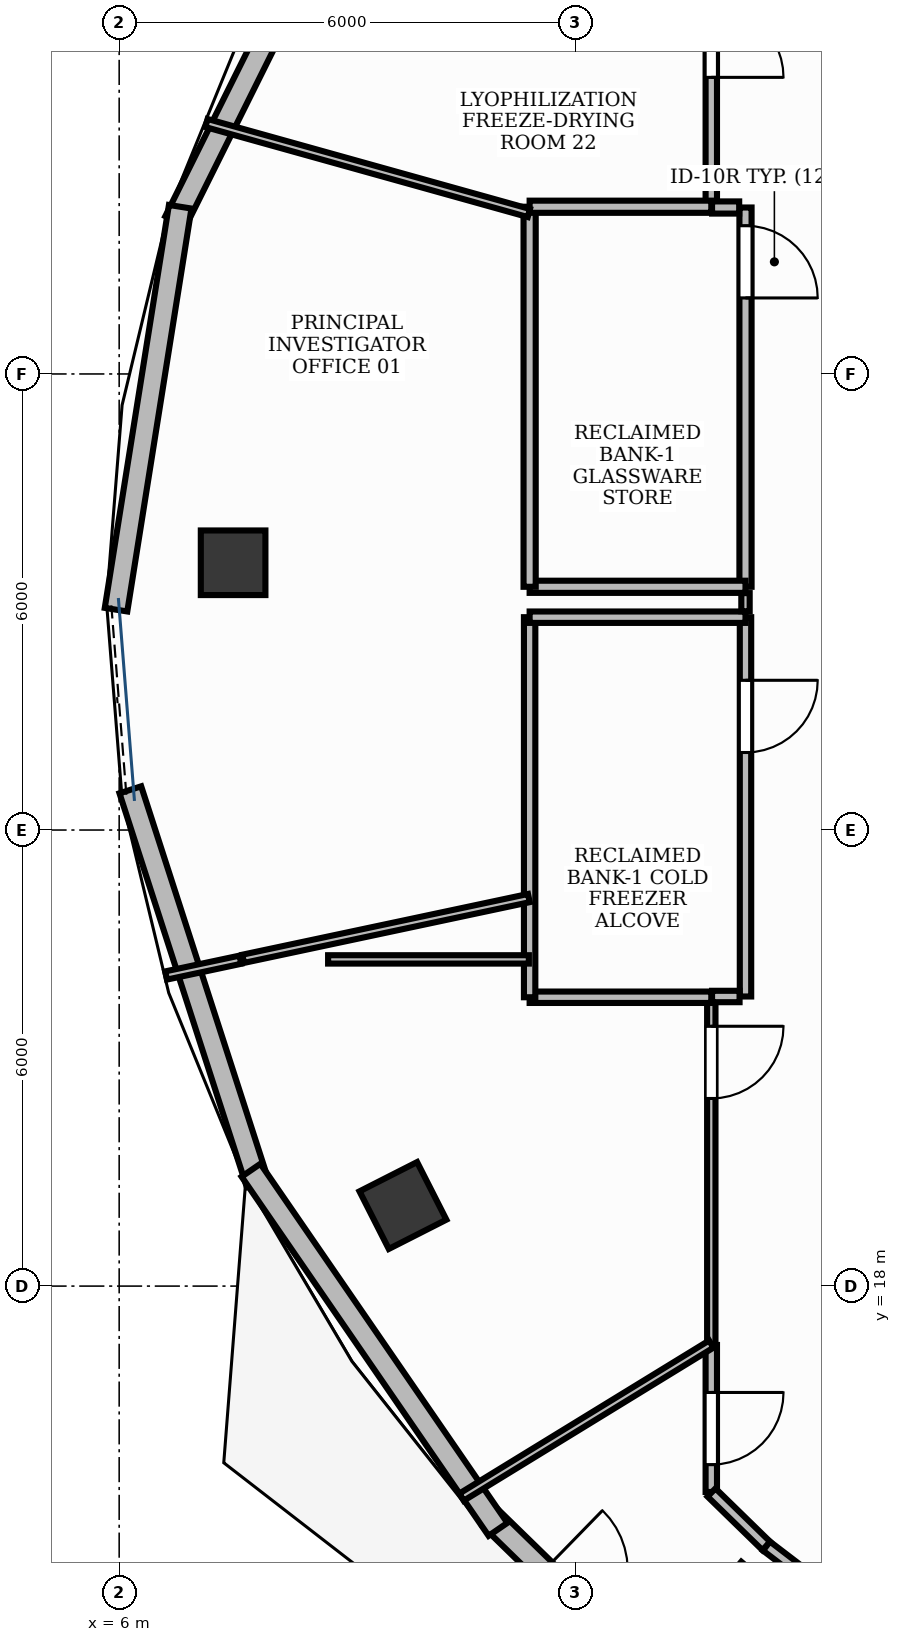
"""IFC4 building model, lengths in metres.
Left out: names, types, materials, properties, quantities, classifications, styles, units other than length and angle.
Written with IfcOpenShell. Run it as: python <this file> out.ifc"""

import sys

from ifc_helpers import new_model, si_unit, direction, frame, frame_2d, origin, origin_2d, place, context, subcontext, project, spatial, rectangle, extrude, element, fill, save


model = new_model("IFC4")
c1 = context("Model", 3, precision=1e-05, world=origin(), true_north=direction((0.0, 1.0)))
c2 = subcontext(c1, "Body", "Model", "MODEL_VIEW")
j1 = project(units=[si_unit("LENGTHUNIT", "METRE"), si_unit("PLANEANGLEUNIT", "RADIAN")], contexts=[c1])
p1 = place(None, origin())
s1 = spatial("IfcSite", under=j1, at=p1, CompositionType="ELEMENT")
p2 = place(p1, origin())
s2 = spatial("IfcBuilding", under=s1, at=p2, CompositionType="ELEMENT")
p3 = place(p2, frame((0.0, 0.0, 252.0)))
s3 = spatial("IfcBuildingStorey", under=s2, at=p3, CompositionType="ELEMENT", Elevation=252.0)
for number, where, z_axis, x_axis in (
    (1, (7.499, 27.516, -0.0), (0.0, 0.0, 1.0), (0.0, 1.0, 0.0)),
    (2, (9.733, 19.06, -0.0), (0.0, 0.0, 1.0), (-0.453, 0.891, 0.0)),
    (3, (14.235, 13.775, -0.0), (0.0, 0.0, 1.0), (-0.764, 0.645, 0.0)),
):
    element("IfcColumn", number, at=place(p3, frame(where, z_axis=z_axis, x_axis=x_axis)), inside=s3, PredefinedType="COLUMN", context=c2, shape_type="SweptSolid", body=[
        extrude(rectangle(XDim=0.85, YDim=0.85, at=origin_2d()), origin(), (0.0, 0.0, 1.0), 3.901),
    ])
p4 = place(p3, frame((10.892, 14.943, 0.0), z_axis=(0.0, 0.0, 1.0), x_axis=(0.716005135245, -0.698095012375, 0.0)))
e4 = element("IfcWall", 4, at=p4, inside=s3, PredefinedType="STANDARD", context=c2, shape_type="SweptSolid", body=[
    extrude(rectangle(XDim=3.053, YDim=0.3, at=frame_2d((1.527, 0.0))), origin(), (0.0, 0.0, 1.0), 3.9),
])
p5 = place(p4, frame((0.977, 0.0, 0.0)))
e5 = element("IfcOpeningElement", 5, at=p5, cuts=e4, PredefinedType="OPENING", context=c2, shape_type="SweptSolid", body=[
    extrude(rectangle(XDim=1.1, YDim=2.15, at=frame_2d((0.55, 1.075))), frame((0.0, 0.165, 0.0), z_axis=(0.0, -1.0, 0.0), x_axis=(1.0, 0.0, 0.0)), (0.0, 0.0, 1.0), 0.33),
])
p6 = place(p3, frame((9.222, 36.999, 0.0), z_axis=(0.0, 0.0, 1.0), x_axis=(-0.445162072567, -0.89545001488, 0.0)))
e6 = element("IfcWall", 6, at=p6, inside=s3, PredefinedType="STANDARD", context=c2, shape_type="SweptSolid", body=[
    extrude(rectangle(XDim=5.573, YDim=0.3, at=frame_2d((2.786, 0.0))), origin(), (0.0, 0.0, 1.0), 3.47),
])
p7 = place(p3, frame((6.803, 32.2, 0.0), z_axis=(0.0, 0.0, 1.0), x_axis=(-0.157240066957, -0.987560408959, 0.0)))
e7 = element("IfcWall", 7, at=p7, inside=s3, PredefinedType="STANDARD", context=c2, shape_type="SweptSolid", body=[
    extrude(rectangle(XDim=5.367, YDim=0.3, at=frame_2d((2.684, 0.0))), origin(), (0.0, 0.0, 1.0), 3.47),
])
p8 = place(p3, frame((6.147, 24.529, 0.0), z_axis=(0.0, 0.0, 1.0), x_axis=(0.307501658213, -0.951547544895, 0.0)))
e8 = element("IfcWall", 8, at=p8, inside=s3, PredefinedType="STANDARD", context=c2, shape_type="SweptSolid", body=[
    extrude(rectangle(XDim=5.447, YDim=0.3, at=frame_2d((2.724, 0.0))), origin(), (0.0, 0.0, 1.0), 3.9),
])
p9 = place(p3, frame((7.735, 19.524, 0.0), z_axis=(0.0, 0.0, 1.0), x_axis=(0.566669772846, -0.823945003349, 0.0)))
e9 = element("IfcWall", 9, at=p9, inside=s3, PredefinedType="STANDARD", context=c2, shape_type="SweptSolid", body=[
    extrude(rectangle(XDim=5.734, YDim=0.3, at=frame_2d((2.867, 0.0))), origin(), (0.0, 0.0, 1.0), 3.9),
])
p10 = place(p3, frame((14.24, 26.8, 0.0), z_axis=(0.0, 0.0, 1.0), x_axis=(0.0, -1.0, 0.0)))
e10 = element("IfcWall", 10, at=p10, inside=s3, PredefinedType="PARTITIONING", context=c2, shape_type="SweptSolid", body=[
    extrude(rectangle(XDim=4.99, YDim=0.15, at=frame_2d((2.495, 0.0))), origin(), (0.0, 0.0, 1.0), 2.91),
])
p11 = place(p10, frame((0.83, 0.0, 0.0)))
e11 = element("IfcOpeningElement", 11, at=p11, cuts=e10, PredefinedType="OPENING", context=c2, shape_type="SweptSolid", body=[
    extrude(rectangle(XDim=0.95, YDim=2.15, at=frame_2d((0.475, 1.075))), frame((0.0, 0.09, 0.0), z_axis=(0.0, -1.0, 0.0), x_axis=(1.0, 0.0, 0.0)), (0.0, 0.0, 1.0), 0.18),
])
p12 = place(p3, frame((14.24, 32.19, 0.0), z_axis=(0.0, 0.0, 1.0), x_axis=(0.0, -1.0, 0.0)))
e12 = element("IfcWall", 12, at=p12, inside=s3, PredefinedType="PARTITIONING", context=c2, shape_type="SweptSolid", body=[
    extrude(rectangle(XDim=4.99, YDim=0.16, at=frame_2d((2.495, 0.0))), origin(), (0.0, 0.0, 1.0), 2.91),
])
p13 = place(p12, frame((0.24, 0.0, 0.0)))
e13 = element("IfcOpeningElement", 13, at=p13, cuts=e12, PredefinedType="OPENING", context=c2, shape_type="SweptSolid", body=[
    extrude(rectangle(XDim=0.95, YDim=2.15, at=frame_2d((0.475, 1.075))), frame((0.0, 0.095, 0.0), z_axis=(0.0, -1.0, 0.0), x_axis=(1.0, 0.0, 0.0)), (0.0, 0.0, 1.0), 0.19),
])
p14 = place(p3, frame((13.79, 21.79, 0.0), z_axis=(0.0, 0.0, 1.0), x_axis=(0.0, -1.0, 0.0)))
e14 = element("IfcWall", 14, at=p14, inside=s3, PredefinedType="MOVABLE", context=c2, shape_type="SweptSolid", body=[
    extrude(rectangle(XDim=4.553, YDim=0.11, at=frame_2d((2.276, 0.0))), origin(), (0.0, 0.0, 1.0), 2.91),
])
p15 = place(p14, frame((0.372, 0.0, 0.0)))
e15 = element("IfcOpeningElement", 15, at=p15, cuts=e14, PredefinedType="OPENING", context=c2, shape_type="SweptSolid", body=[
    extrude(rectangle(XDim=0.95, YDim=2.15, at=frame_2d((0.475, 1.075))), frame((0.0, 0.07, 0.0), z_axis=(0.0, -1.0, 0.0), x_axis=(1.0, 0.0, 0.0)), (0.0, 0.0, 1.0), 0.14),
])
p16 = place(p3, frame((13.79, 17.226, 0.0), z_axis=(0.0, 0.0, 1.0), x_axis=(0.0, -1.0, 0.0)))
e16 = element("IfcWall", 16, at=p16, inside=s3, PredefinedType="PARTITIONING", context=c2, shape_type="SweptSolid", body=[
    extrude(rectangle(XDim=1.934, YDim=0.15, at=frame_2d((0.967, 0.0))), origin(), (0.0, 0.0, 1.0), 2.91),
])
p17 = place(p16, frame((0.625, 0.0, 0.0)))
e17 = element("IfcOpeningElement", 17, at=p17, cuts=e16, PredefinedType="OPENING", context=c2, shape_type="SweptSolid", body=[
    extrude(rectangle(XDim=0.95, YDim=2.15, at=frame_2d((0.475, 1.075))), frame((0.0, 0.09, 0.0), z_axis=(0.0, -1.0, 0.0), x_axis=(1.0, 0.0, 0.0)), (0.0, 0.0, 1.0), 0.18),
])
p18 = place(p3, frame((13.79, 35.092, 0.0), z_axis=(0.0, 0.0, 1.0), x_axis=(0.0, -1.0, 0.0)))
e18 = element("IfcWall", 18, at=p18, inside=s3, PredefinedType="PARTITIONING", context=c2, shape_type="SweptSolid", body=[
    extrude(rectangle(XDim=2.882, YDim=0.15, at=frame_2d((1.441, 0.0))), origin(), (0.0, 0.0, 1.0), 2.91),
])
p19 = place(p18, frame((0.24, 0.0, 0.0)))
e19 = element("IfcOpeningElement", 19, at=p19, cuts=e18, PredefinedType="OPENING", context=c2, shape_type="SweptSolid", body=[
    extrude(rectangle(XDim=0.95, YDim=2.15, at=frame_2d((0.475, 1.075))), frame((0.0, 0.09, 0.0), z_axis=(0.0, -1.0, 0.0), x_axis=(1.0, 0.0, 0.0)), (0.0, 0.0, 1.0), 0.18),
])
p20 = place(p3, frame((14.162, 21.81, 0.0), z_axis=(0.0, 0.0, 1.0), x_axis=(-1.0, 0.0, 0.0)))
e20 = element("IfcWall", 20, at=p20, inside=s3, PredefinedType="PARTITIONING", context=c2, shape_type="SweptSolid", body=[
    extrude(rectangle(XDim=0.362, YDim=0.15, at=frame_2d((0.181, 0.0))), origin(), (0.0, 0.0, 1.0), 2.91),
])
p21 = place(p3, frame((13.79, 21.8, 0.0), z_axis=(0.0, 0.0, 1.0), x_axis=(-1.0, 0.0, 0.0)))
e21 = element("IfcWall", 21, at=p21, inside=s3, PredefinedType="PARTITIONING", context=c2, shape_type="SweptSolid", body=[
    extrude(rectangle(XDim=2.39, YDim=0.15, at=frame_2d((1.195, 0.0))), origin(), (0.0, 0.0, 1.0), 2.91),
])
p22 = place(p3, frame((11.4, 21.8, 0.0), z_axis=(0.0, 0.0, 1.0), x_axis=(0.0, 1.0, 0.0)))
e22 = element("IfcWall", 22, at=p22, inside=s3, PredefinedType="PARTITIONING", context=c2, shape_type="SweptSolid", body=[
    extrude(rectangle(XDim=5.0, YDim=0.15, at=frame_2d((2.5, 0.0))), origin(), (0.0, 0.0, 1.0), 2.91),
])
p23 = place(p3, frame((11.4, 26.8, 0.0), z_axis=(0.0, 0.0, 1.0), x_axis=(1.0, 0.0, 0.0)))
e23 = element("IfcWall", 23, at=p23, inside=s3, PredefinedType="PARTITIONING", context=c2, shape_type="SweptSolid", body=[
    extrude(rectangle(XDim=2.84, YDim=0.15, at=frame_2d((1.42, 0.0))), origin(), (0.0, 0.0, 1.0), 2.91),
])
p24 = place(p3, frame((13.8, 32.19, 0.0), z_axis=(0.0, 0.0, 1.0), x_axis=(1.0, 0.0, 0.0)))
e24 = element("IfcWall", 24, at=p24, inside=s3, PredefinedType="PARTITIONING", context=c2, shape_type="SweptSolid", body=[
    extrude(rectangle(XDim=0.357, YDim=0.16, at=frame_2d((0.178, 0.0))), origin(), (0.0, 0.0, 1.0), 2.91),
])
p25 = place(p3, frame((14.24, 27.2, 0.0), z_axis=(0.0, 0.0, 1.0), x_axis=(-1.0, 0.0, 0.0)))
e25 = element("IfcWall", 25, at=p25, inside=s3, PredefinedType="PARTITIONING", context=c2, shape_type="SweptSolid", body=[
    extrude(rectangle(XDim=2.84, YDim=0.16, at=frame_2d((1.42, 0.0))), origin(), (0.0, 0.0, 1.0), 2.91),
])
p26 = place(p3, frame((11.4, 27.2, 0.0), z_axis=(0.0, 0.0, 1.0), x_axis=(0.0, 1.0, 0.0)))
e26 = element("IfcWall", 26, at=p26, inside=s3, PredefinedType="PARTITIONING", context=c2, shape_type="SweptSolid", body=[
    extrude(rectangle(XDim=5.0, YDim=0.16, at=frame_2d((2.5, 0.0))), origin(), (0.0, 0.0, 1.0), 2.91),
])
p27 = place(p3, frame((11.4, 32.2, 0.0), z_axis=(0.0, 0.0, 1.0), x_axis=(1.0, 0.0, 0.0)))
e27 = element("IfcWall", 27, at=p27, inside=s3, PredefinedType="PARTITIONING", context=c2, shape_type="SweptSolid", body=[
    extrude(rectangle(XDim=2.39, YDim=0.16, at=frame_2d((1.195, 0.0))), origin(), (0.0, 0.0, 1.0), 2.91),
])
p28 = place(p3, frame((7.149, 33.301, 0.0), z_axis=(0.0, 0.0, 1.0), x_axis=(0.963167586418, -0.268901841707, 0.0)))
e28 = element("IfcWall", 28, at=p28, inside=s3, PredefinedType="MOVABLE", context=c2, shape_type="SweptSolid", body=[
    extrude(rectangle(XDim=4.403, YDim=0.11, at=frame_2d((2.202, 0.0))), origin(), (0.0, 0.0, 1.0), 2.91),
])
p29 = place(p3, frame((14.24, 27.117, 0.0), z_axis=(0.0, 0.0, 1.0), x_axis=(0.0, -1.0, 0.0)))
e29 = element("IfcWall", 29, at=p29, inside=s3, PredefinedType="MOVABLE", context=c2, shape_type="SweptSolid", body=[
    extrude(rectangle(XDim=0.239, YDim=0.11, at=frame_2d((0.12, 0.0))), origin(), (0.0, 0.0, 1.0), 2.91),
])
p30 = place(p3, frame((11.39, 23.105, 0.0), z_axis=(0.0, 0.0, 1.0), x_axis=(-0.978148837506, -0.207905872179, 0.0)))
e30 = element("IfcWall", 30, at=p30, inside=s3, PredefinedType="MOVABLE", context=c2, shape_type="SweptSolid", body=[
    extrude(rectangle(XDim=3.842, YDim=0.11, at=frame_2d((1.921, 0.0))), origin(), (0.0, 0.0, 1.0), 2.91),
])
p31 = place(p3, frame((8.749, 22.298, 0.0), z_axis=(0.0, 0.0, 1.0), x_axis=(1.0, 0.0, 0.0)))
e31 = element("IfcWall", 31, at=p31, inside=s3, PredefinedType="MOVABLE", context=c2, shape_type="SweptSolid", body=[
    extrude(rectangle(XDim=2.641, YDim=0.11, at=frame_2d((1.321, 0.0))), origin(), (0.0, 0.0, 1.0), 2.91),
])
p32 = place(p3, frame((13.79, 17.237, 0.0), z_axis=(0.0, 0.0, 1.0), x_axis=(-0.852642224979, -0.522495202066, 0.0)))
e32 = element("IfcWall", 32, at=p32, inside=s3, PredefinedType="MOVABLE", context=c2, shape_type="SweptSolid", body=[
    extrude(rectangle(XDim=3.854, YDim=0.11, at=frame_2d((1.927, 0.0))), origin(), (0.0, 0.0, 1.0), 2.91),
])
p33 = place(p3, frame((6.617, 22.086, 0.0), z_axis=(0.0, 0.0, 1.0), x_axis=(0.978112274726, 0.208077817245, 0.0)))
e33 = element("IfcWall", 33, at=p33, inside=s3, PredefinedType="MOVABLE", context=c2, shape_type="SweptSolid", body=[
    extrude(rectangle(XDim=1.0, YDim=0.11, at=frame_2d((0.5, 0.0))), origin(), (0.0, 0.0, 1.0), 2.91),
])
p34 = place(p3, frame((13.793, 15.284, 0.0), z_axis=(0.0, 0.0, 1.0), x_axis=(0.7160122468, -0.698087718294, 0.0)))
e34 = element("IfcWall", 34, at=p34, inside=s3, PredefinedType="PARTITIONING", context=c2, shape_type="SweptSolid", body=[
    extrude(rectangle(XDim=1.008, YDim=0.15, at=frame_2d((0.504, 0.0))), origin(), (0.0, 0.0, 1.0), 2.91),
])
p35 = place(p3, frame((14.516, 14.58, 0.0), z_axis=(0.0, 0.0, 1.0), x_axis=(0.794390609039, -0.60740724417, 0.0)))
e35 = element("IfcWall", 35, at=p35, inside=s3, PredefinedType="PARTITIONING", context=c2, shape_type="SweptSolid", body=[
    extrude(rectangle(XDim=2.749, YDim=0.15, at=frame_2d((1.374, 0.0))), origin(), (0.0, 0.0, 1.0), 2.91),
])
p36 = place(p11, origin())
e36 = element("IfcDoor", 36, at=p36, inside=s3, OperationType="SINGLE_SWING_LEFT", PredefinedType="DOOR", context=c2, shape_type="SweptSolid", body=[
    extrude(rectangle(XDim=0.95, YDim=2.15, at=frame_2d((0.475, 1.075))), frame((0.0, 0.025, 0.0), z_axis=(0.0, -1.0, 0.0), x_axis=(1.0, 0.0, 0.0)), (0.0, 0.0, 1.0), 0.05),
])
fill(e11, e36)
p37 = place(p13, origin())
e37 = element("IfcDoor", 37, at=p37, inside=s3, OperationType="SINGLE_SWING_RIGHT", PredefinedType="DOOR", context=c2, shape_type="SweptSolid", body=[
    extrude(rectangle(XDim=0.95, YDim=2.15, at=frame_2d((0.475, 1.075))), frame((0.0, 0.025, 0.0), z_axis=(0.0, -1.0, 0.0), x_axis=(1.0, 0.0, 0.0)), (0.0, 0.0, 1.0), 0.05),
])
fill(e13, e37)
p38 = place(p15, origin())
e38 = element("IfcDoor", 38, at=p38, inside=s3, OperationType="SINGLE_SWING_LEFT", PredefinedType="DOOR", context=c2, shape_type="SweptSolid", body=[
    extrude(rectangle(XDim=0.95, YDim=2.15, at=frame_2d((0.475, 1.075))), frame((0.0, 0.025, 0.0), z_axis=(0.0, -1.0, 0.0), x_axis=(1.0, 0.0, 0.0)), (0.0, 0.0, 1.0), 0.05),
])
fill(e15, e38)
p39 = place(p17, origin())
e39 = element("IfcDoor", 39, at=p39, inside=s3, OperationType="SINGLE_SWING_LEFT", PredefinedType="DOOR", context=c2, shape_type="SweptSolid", body=[
    extrude(rectangle(XDim=0.95, YDim=2.15, at=frame_2d((0.475, 1.075))), frame((0.0, 0.025, 0.0), z_axis=(0.0, -1.0, 0.0), x_axis=(1.0, 0.0, 0.0)), (0.0, 0.0, 1.0), 0.05),
])
fill(e17, e39)
p40 = place(p19, origin())
e40 = element("IfcDoor", 40, at=p40, inside=s3, OperationType="SINGLE_SWING_RIGHT", PredefinedType="DOOR", context=c2, shape_type="SweptSolid", body=[
    extrude(rectangle(XDim=0.95, YDim=2.15, at=frame_2d((0.475, 1.075))), frame((0.0, 0.025, 0.0), z_axis=(0.0, -1.0, 0.0), x_axis=(1.0, 0.0, 0.0)), (0.0, 0.0, 1.0), 0.05),
])
fill(e19, e40)
save(model, sys.argv[1])
